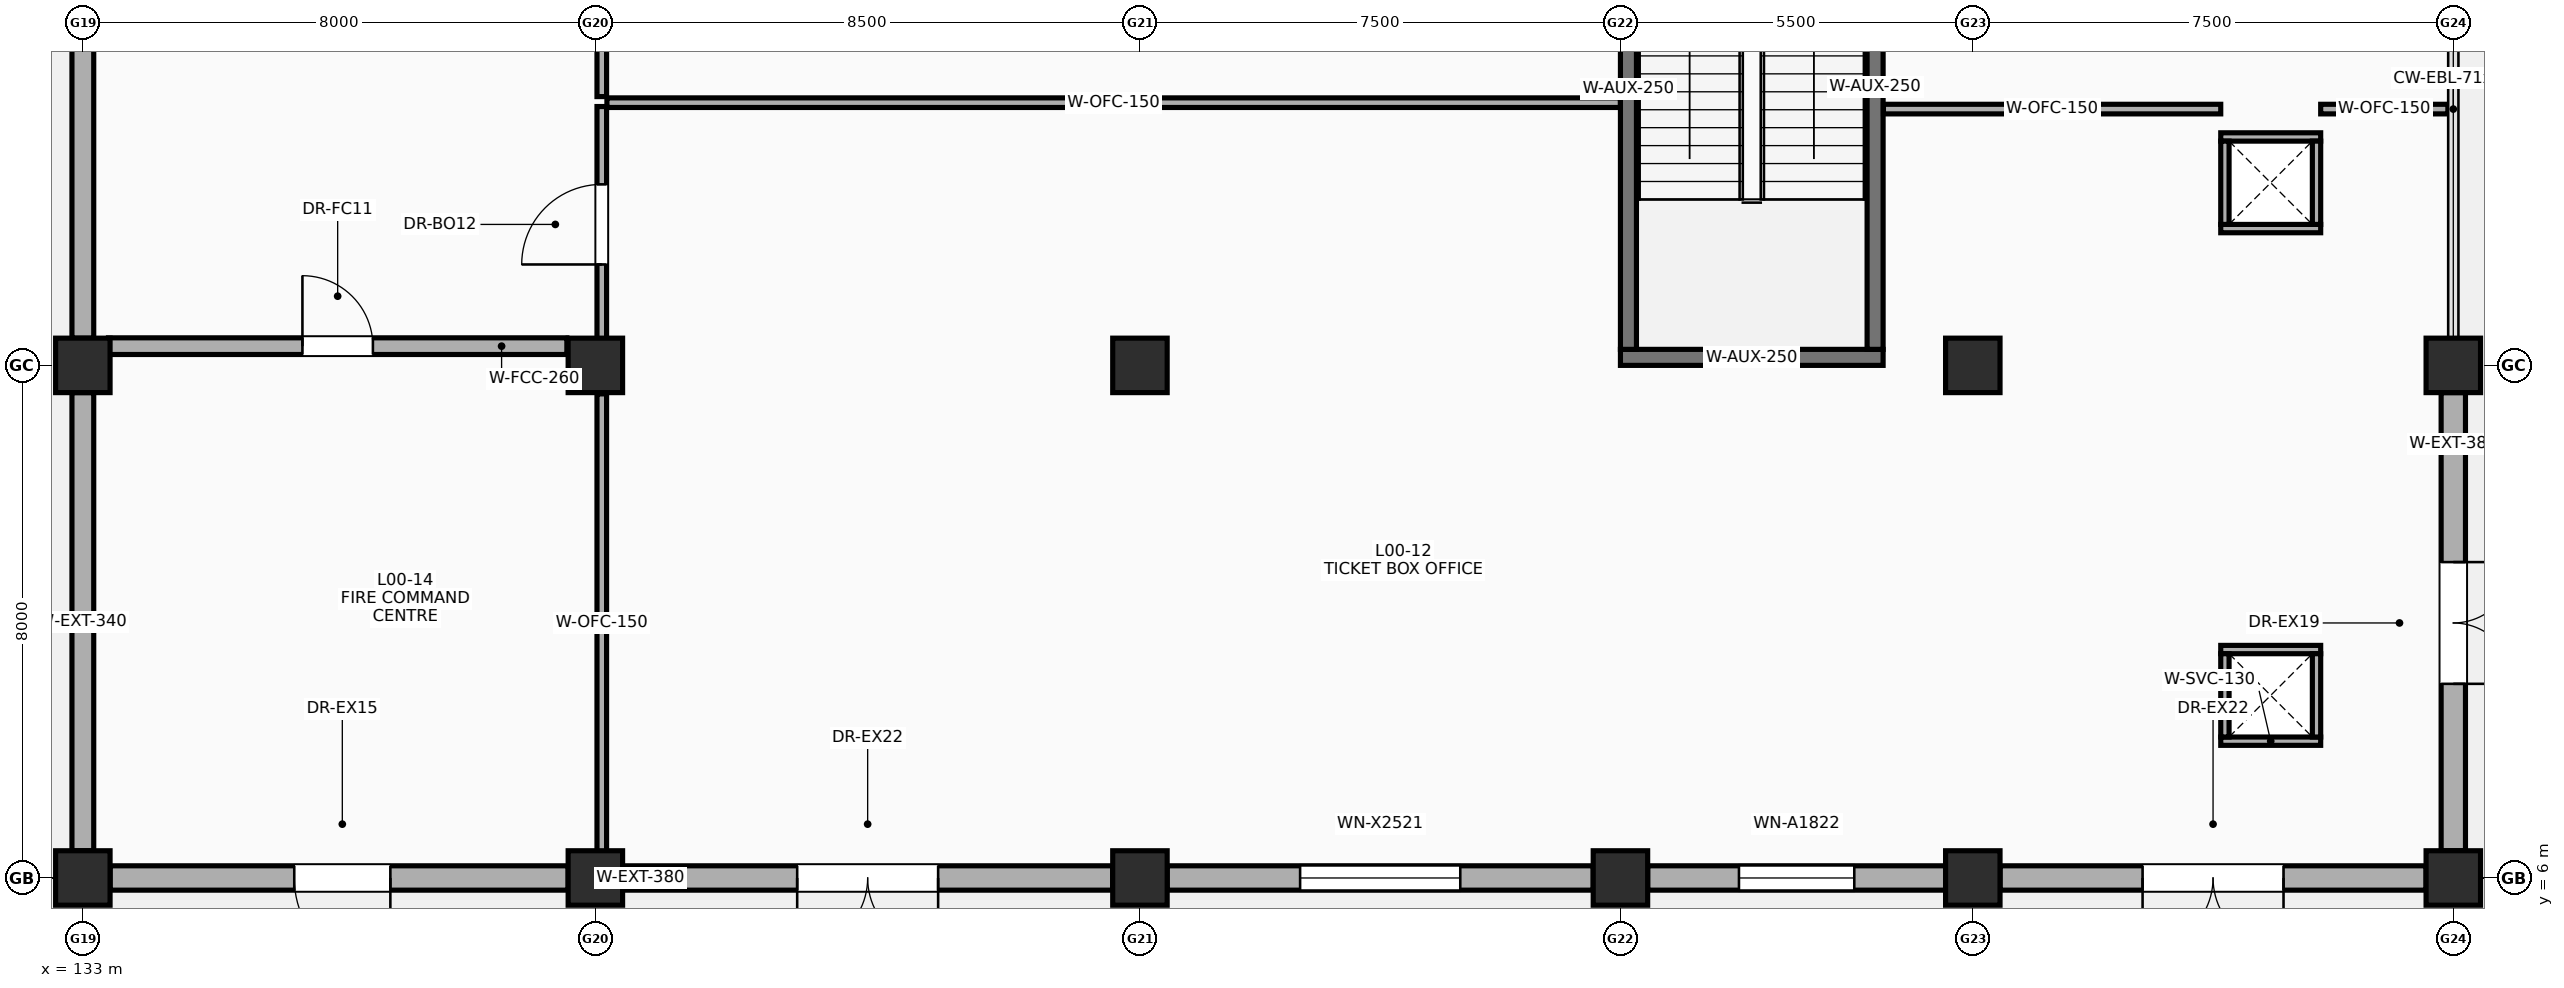
"""IFC4 building model, lengths in metres.
Left out: names, types, materials, properties, quantities, classifications, styles, units other than length and angle.
Written with IfcOpenShell. Run it as: python <this file> out.ifc"""

import sys

from ifc_helpers import new_model, si_unit, direction, frame, frame_2d, origin, origin_2d, place, context, subcontext, project, spatial, rectangle, extrude, element, fill, save


model = new_model("IFC4")
c1 = context("Model", 3, precision=1e-05, world=origin(), true_north=direction((0.0, 1.0)))
c2 = subcontext(c1, "Body", "Model", "MODEL_VIEW")
j1 = project(units=[si_unit("LENGTHUNIT", "METRE"), si_unit("PLANEANGLEUNIT", "RADIAN")], contexts=[c1])
p1 = place(None, origin())
s1 = spatial("IfcSite", under=j1, at=p1, CompositionType="ELEMENT")
p2 = place(p1, origin())
s2 = spatial("IfcBuilding", under=s1, at=p2, CompositionType="ELEMENT")
p3 = place(p2, origin())
s3 = spatial("IfcBuildingStorey", under=s2, at=p3, CompositionType="ELEMENT", Elevation=0.0)
for number, where, z_axis, x_axis in (
    (1, (133.0, 6.0, 0.0), (0.0, 0.0, 1.0), (1.0, 0.0, 0.0)),
    (2, (133.0, 14.0, 0.0), (0.0, 0.0, 1.0), (1.0, 0.0, 0.0)),
    (3, (141.0, 6.0, 0.0), (0.0, 0.0, 1.0), (1.0, 0.0, 0.0)),
    (4, (141.0, 14.0, 0.0), (0.0, 0.0, 1.0), (1.0, 0.0, 0.0)),
    (5, (149.5, 6.0, 0.0), (0.0, 0.0, 1.0), (1.0, 0.0, 0.0)),
    (6, (149.5, 14.0, 0.0), (0.0, 0.0, 1.0), (1.0, 0.0, 0.0)),
    (7, (157.0, 6.0, 0.0), (0.0, 0.0, 1.0), (1.0, 0.0, 0.0)),
    (8, (162.5, 6.0, 0.0), (0.0, 0.0, 1.0), (1.0, 0.0, 0.0)),
    (9, (162.5, 14.0, 0.0), (0.0, 0.0, 1.0), (1.0, 0.0, 0.0)),
    (10, (170.0, 6.0, 0.0), (0.0, 0.0, 1.0), (1.0, 0.0, 0.0)),
    (11, (170.0, 14.0, 0.0), (0.0, 0.0, 1.0), (1.0, 0.0, 0.0)),
):
    element("IfcColumn", number, at=place(p3, frame(where, z_axis=z_axis, x_axis=x_axis)), inside=s3, PredefinedType="COLUMN", context=c2, shape_type="SweptSolid", body=[
        extrude(rectangle(XDim=0.85, YDim=0.85, at=origin_2d()), origin(), (0.0, 0.0, 1.0), 5.4),
    ])
p4 = place(p3, frame((133.425, 6.0, 0.0), z_axis=(0.0, 0.0, 1.0), x_axis=(1.0, 0.0, 0.0)))
e12 = element("IfcWall", 12, at=p4, inside=s3, PredefinedType="SOLIDWALL", context=c2, shape_type="SweptSolid", body=[
    extrude(rectangle(XDim=7.15, YDim=0.38, at=frame_2d((3.575, 0.0))), origin(), (0.0, 0.0, 1.0), 4.15),
])
p5 = place(p4, frame((4.375, 0.0, 0.0), z_axis=(0.0, 0.0, 1.0), x_axis=(-1.0, 0.0, 0.0)))
e13 = element("IfcOpeningElement", 13, at=p5, cuts=e12, PredefinedType="OPENING", context=c2, shape_type="SweptSolid", body=[
    extrude(rectangle(XDim=1.5, YDim=2.25, at=frame_2d((0.75, 1.125))), frame((0.0, 0.2, 0.0), z_axis=(0.0, -1.0, 0.0), x_axis=(1.0, 0.0, 0.0)), (0.0, 0.0, 1.0), 0.4),
])
p6 = place(p3, frame((141.425, 6.0, 0.0), z_axis=(0.0, 0.0, 1.0), x_axis=(1.0, 0.0, 0.0)))
e14 = element("IfcWall", 14, at=p6, inside=s3, PredefinedType="SOLIDWALL", context=c2, shape_type="SweptSolid", body=[
    extrude(rectangle(XDim=7.65, YDim=0.38, at=frame_2d((3.825, 0.0))), origin(), (0.0, 0.0, 1.0), 4.15),
])
p7 = place(p6, frame((4.925, 0.0, 0.0), z_axis=(0.0, 0.0, 1.0), x_axis=(-1.0, 0.0, 0.0)))
e15 = element("IfcOpeningElement", 15, at=p7, cuts=e14, PredefinedType="OPENING", context=c2, shape_type="SweptSolid", body=[
    extrude(rectangle(XDim=2.2, YDim=2.6, at=frame_2d((1.1, 1.3))), frame((0.0, 0.2, 0.0), z_axis=(0.0, -1.0, 0.0), x_axis=(1.0, 0.0, 0.0)), (0.0, 0.0, 1.0), 0.4),
])
p8 = place(p3, frame((149.925, 6.0, 0.0), z_axis=(0.0, 0.0, 1.0), x_axis=(1.0, 0.0, 0.0)))
e16 = element("IfcWall", 16, at=p8, inside=s3, PredefinedType="SOLIDWALL", context=c2, shape_type="SweptSolid", body=[
    extrude(rectangle(XDim=6.65, YDim=0.38, at=frame_2d((3.325, 0.0))), origin(), (0.0, 0.0, 1.0), 3.9),
])
p9 = place(p8, frame((2.075, 0.0, 0.85)))
e17 = element("IfcOpeningElement", 17, at=p9, cuts=e16, PredefinedType="OPENING", context=c2, shape_type="SweptSolid", body=[
    extrude(rectangle(XDim=2.5, YDim=2.1, at=frame_2d((1.25, 1.05))), frame((0.0, 0.2, 0.0), z_axis=(0.0, -1.0, 0.0), x_axis=(1.0, 0.0, 0.0)), (0.0, 0.0, 1.0), 0.4),
])
p10 = place(p3, frame((157.425, 6.0, 0.0), z_axis=(0.0, 0.0, 1.0), x_axis=(1.0, 0.0, 0.0)))
e18 = element("IfcWall", 18, at=p10, inside=s3, PredefinedType="SOLIDWALL", context=c2, shape_type="SweptSolid", body=[
    extrude(rectangle(XDim=4.65, YDim=0.38, at=frame_2d((2.325, 0.0))), origin(), (0.0, 0.0, 1.0), 3.9),
])
p11 = place(p10, frame((1.425, 0.0, 0.85)))
e19 = element("IfcOpeningElement", 19, at=p11, cuts=e18, PredefinedType="OPENING", context=c2, shape_type="SweptSolid", body=[
    extrude(rectangle(XDim=1.8, YDim=2.2, at=frame_2d((0.9, 1.1))), frame((0.0, 0.2, 0.0), z_axis=(0.0, -1.0, 0.0), x_axis=(1.0, 0.0, 0.0)), (0.0, 0.0, 1.0), 0.4),
])
p12 = place(p3, frame((162.925, 6.0, 0.0), z_axis=(0.0, 0.0, 1.0), x_axis=(1.0, 0.0, 0.0)))
e20 = element("IfcWall", 20, at=p12, inside=s3, PredefinedType="SOLIDWALL", context=c2, shape_type="SweptSolid", body=[
    extrude(rectangle(XDim=6.65, YDim=0.38, at=frame_2d((3.325, 0.0))), origin(), (0.0, 0.0, 1.0), 4.15),
])
p13 = place(p12, frame((4.425, 0.0, 0.0), z_axis=(0.0, 0.0, 1.0), x_axis=(-1.0, 0.0, 0.0)))
e21 = element("IfcOpeningElement", 21, at=p13, cuts=e20, PredefinedType="OPENING", context=c2, shape_type="SweptSolid", body=[
    extrude(rectangle(XDim=2.2, YDim=2.6, at=frame_2d((1.1, 1.3))), frame((0.0, 0.2, 0.0), z_axis=(0.0, -1.0, 0.0), x_axis=(1.0, 0.0, 0.0)), (0.0, 0.0, 1.0), 0.4),
])
p14 = place(p3, frame((170.0, 6.425, 0.0), z_axis=(0.0, 0.0, 1.0), x_axis=(0.0, 1.0, 0.0)))
e22 = element("IfcWall", 22, at=p14, inside=s3, PredefinedType="SOLIDWALL", context=c2, shape_type="SweptSolid", body=[
    extrude(rectangle(XDim=7.15, YDim=0.38, at=frame_2d((3.575, 0.0))), origin(), (0.0, 0.0, 1.0), 4.15),
])
p15 = place(p14, frame((4.505, 0.0, 0.0), z_axis=(0.0, 0.0, 1.0), x_axis=(-1.0, 0.0, 0.0)))
e23 = element("IfcOpeningElement", 23, at=p15, cuts=e22, PredefinedType="OPENING", context=c2, shape_type="SweptSolid", body=[
    extrude(rectangle(XDim=1.9, YDim=2.35, at=frame_2d((0.95, 1.175))), frame((0.0, 0.2, 0.0), z_axis=(0.0, -1.0, 0.0), x_axis=(1.0, 0.0, 0.0)), (0.0, 0.0, 1.0), 0.4),
])
p16 = place(p3, frame((133.0, 6.425, 0.0), z_axis=(0.0, 0.0, 1.0), x_axis=(0.0, 1.0, 0.0)))
e24 = element("IfcWall", 24, at=p16, inside=s3, PredefinedType="SOLIDWALL", context=c2, shape_type="SweptSolid", body=[
    extrude(rectangle(XDim=7.15, YDim=0.34, at=frame_2d((3.575, 0.0))), origin(), (0.0, 0.0, 1.0), 4.15),
])
p17 = place(p3, frame((133.0, 14.425, 0.0), z_axis=(0.0, 0.0, 1.0), x_axis=(0.0, 1.0, 0.0)))
e25 = element("IfcWall", 25, at=p17, inside=s3, PredefinedType="SOLIDWALL", context=c2, shape_type="SweptSolid", body=[
    extrude(rectangle(XDim=7.125, YDim=0.34, at=frame_2d((3.562, 0.0))), origin(), (0.0, 0.0, 1.0), 4.15),
])
p18 = place(p3, frame((157.0, 14.125, 0.0), z_axis=(0.0, 0.0, 1.0), x_axis=(1.0, 0.0, 0.0)))
e26 = element("IfcWall", 26, at=p18, inside=s3, PredefinedType="SHEAR", context=c2, shape_type="SweptSolid", body=[
    extrude(rectangle(XDim=4.1, YDim=0.25, at=frame_2d((2.05, 0.0))), origin(), (0.0, 0.0, 1.0), 5.4),
])
p19 = place(p3, frame((160.975, 14.25, 0.0), z_axis=(0.0, 0.0, 1.0), x_axis=(0.0, 1.0, 0.0)))
e27 = element("IfcWall", 27, at=p19, inside=s3, PredefinedType="SHEAR", context=c2, shape_type="SweptSolid", body=[
    extrude(rectangle(XDim=8.2, YDim=0.25, at=frame_2d((4.1, 0.0))), origin(), (0.0, 0.0, 1.0), 5.4),
])
for number, where, z_axis, x_axis in (
    (28, (166.37, 8.135, 0.0), (0.0, 0.0, 1.0), (1.0, 0.0, 0.0)),
    (29, (166.37, 9.565, 0.0), (0.0, 0.0, 1.0), (1.0, 0.0, 0.0)),
):
    element("IfcWall", number, at=place(p3, frame(where, z_axis=z_axis, x_axis=x_axis)), inside=s3, PredefinedType="PARTITIONING", context=c2, shape_type="SweptSolid", body=[
        extrude(rectangle(XDim=1.56, YDim=0.13, at=frame_2d((0.78, 0.0))), origin(), (0.0, 0.0, 1.0), 5.1),
    ])
for number, where, z_axis, x_axis in (
    (30, (166.435, 8.2, 0.0), (0.0, 0.0, 1.0), (0.0, 1.0, 0.0)),
    (31, (167.865, 8.2, 0.0), (0.0, 0.0, 1.0), (0.0, 1.0, 0.0)),
):
    element("IfcWall", number, at=place(p3, frame(where, z_axis=z_axis, x_axis=x_axis)), inside=s3, PredefinedType="PARTITIONING", context=c2, shape_type="SweptSolid", body=[
        extrude(rectangle(XDim=1.3, YDim=0.13, at=frame_2d((0.65, 0.0))), origin(), (0.0, 0.0, 1.0), 5.1),
    ])
for number, where, z_axis, x_axis in (
    (32, (166.37, 16.135, 0.0), (0.0, 0.0, 1.0), (1.0, 0.0, 0.0)),
    (33, (166.37, 17.565, 0.0), (0.0, 0.0, 1.0), (1.0, 0.0, 0.0)),
):
    element("IfcWall", number, at=place(p3, frame(where, z_axis=z_axis, x_axis=x_axis)), inside=s3, PredefinedType="PARTITIONING", context=c2, shape_type="SweptSolid", body=[
        extrude(rectangle(XDim=1.56, YDim=0.13, at=frame_2d((0.78, 0.0))), origin(), (0.0, 0.0, 1.0), 5.1),
    ])
for number, where, z_axis, x_axis in (
    (34, (166.435, 16.2, 0.0), (0.0, 0.0, 1.0), (0.0, 1.0, 0.0)),
    (35, (167.865, 16.2, 0.0), (0.0, 0.0, 1.0), (0.0, 1.0, 0.0)),
):
    element("IfcWall", number, at=place(p3, frame(where, z_axis=z_axis, x_axis=x_axis)), inside=s3, PredefinedType="PARTITIONING", context=c2, shape_type="SweptSolid", body=[
        extrude(rectangle(XDim=1.3, YDim=0.13, at=frame_2d((0.65, 0.0))), origin(), (0.0, 0.0, 1.0), 5.1),
    ])
p20 = place(p3, frame((141.18, 18.1, 0.0), z_axis=(0.0, 0.0, 1.0), x_axis=(1.0, 0.0, 0.0)))
e36 = element("IfcWall", 36, at=p20, inside=s3, PredefinedType="PARTITIONING", context=c2, shape_type="SweptSolid", body=[
    extrude(rectangle(XDim=15.82, YDim=0.15, at=frame_2d((7.91, 0.0))), origin(), (0.0, 0.0, 1.0), 3.9),
])
p21 = place(p3, frame((141.1, 6.4, 0.0), z_axis=(0.0, 0.0, 1.0), x_axis=(0.0, 1.0, 0.0)))
e37 = element("IfcWall", 37, at=p21, inside=s3, PredefinedType="PARTITIONING", context=c2, shape_type="SweptSolid", body=[
    extrude(rectangle(XDim=7.155, YDim=0.15, at=frame_2d((3.578, 0.0))), origin(), (0.0, 0.0, 1.0), 4.2),
])
p22 = place(p3, frame((141.1, 14.4, 0.0), z_axis=(0.0, 0.0, 1.0), x_axis=(0.0, 1.0, 0.0)))
e38 = element("IfcWall", 38, at=p22, inside=s3, PredefinedType="PARTITIONING", context=c2, shape_type="SweptSolid", body=[
    extrude(rectangle(XDim=3.64, YDim=0.15, at=frame_2d((1.82, 0.0))), origin(), (0.0, 0.0, 1.0), 4.2),
])
p23 = place(p22, frame((1.175, 0.0, 0.0)))
e39 = element("IfcOpeningElement", 39, at=p23, cuts=e38, PredefinedType="OPENING", context=c2, shape_type="SweptSolid", body=[
    extrude(rectangle(XDim=1.25, YDim=2.15, at=frame_2d((0.625, 1.075))), frame((0.0, 0.085, 0.0), z_axis=(0.0, -1.0, 0.0), x_axis=(1.0, 0.0, 0.0)), (0.0, 0.0, 1.0), 0.17),
])
p24 = place(p3, frame((133.4, 14.3, 0.0), z_axis=(0.0, 0.0, 1.0), x_axis=(1.0, 0.0, 0.0)))
e40 = element("IfcWall", 40, at=p24, inside=s3, PredefinedType="SOLIDWALL", context=c2, shape_type="SweptSolid", body=[
    extrude(rectangle(XDim=7.155, YDim=0.26, at=frame_2d((3.578, 0.0))), origin(), (0.0, 0.0, 1.0), 4.2),
])
p25 = place(p24, frame((3.028, 0.0, 0.0)))
e41 = element("IfcOpeningElement", 41, at=p25, cuts=e40, PredefinedType="OPENING", context=c2, shape_type="SweptSolid", body=[
    extrude(rectangle(XDim=1.1, YDim=2.18, at=frame_2d((0.55, 1.09))), frame((0.0, 0.14, 0.0), z_axis=(0.0, -1.0, 0.0), x_axis=(1.0, 0.0, 0.0)), (0.0, 0.0, 1.0), 0.28),
])
p26 = place(p3, frame((161.105, 18.0, 0.0), z_axis=(0.0, 0.0, 1.0), x_axis=(1.0, 0.0, 0.0)))
e42 = element("IfcWall", 42, at=p26, inside=s3, PredefinedType="PARTITIONING", context=c2, shape_type="SweptSolid", body=[
    extrude(rectangle(XDim=5.265, YDim=0.15, at=frame_2d((2.633, 0.0))), origin(), (0.0, 0.0, 1.0), 4.2),
])
p27 = place(p3, frame((167.93, 18.0, 0.0), z_axis=(0.0, 0.0, 1.0), x_axis=(1.0, 0.0, 0.0)))
e43 = element("IfcWall", 43, at=p27, inside=s3, PredefinedType="PARTITIONING", context=c2, shape_type="SweptSolid", body=[
    extrude(rectangle(XDim=1.985, YDim=0.15, at=frame_2d((0.993, 0.0))), origin(), (0.0, 0.0, 1.0), 4.2),
])
p28 = place(p3, frame((157.125, 14.25, 0.0), z_axis=(0.0, 0.0, 1.0), x_axis=(0.0, 1.0, 0.0)))
e44 = element("IfcWall", 44, at=p28, inside=s3, PredefinedType="SHEAR", context=c2, shape_type="SweptSolid", body=[
    extrude(rectangle(XDim=8.13, YDim=0.25, at=frame_2d((4.065, 0.0))), origin(), (0.0, 0.0, 1.0), 5.4),
])
p29 = place(p3, frame((141.1, 18.195, 0.0), z_axis=(0.0, 0.0, 1.0), x_axis=(0.0, 1.0, 0.0)))
e45 = element("IfcWall", 45, at=p29, inside=s3, PredefinedType="PARTITIONING", context=c2, shape_type="SweptSolid", body=[
    extrude(rectangle(XDim=3.36, YDim=0.15, at=frame_2d((1.68, 0.0))), origin(), (0.0, 0.0, 1.0), 4.2),
])
p30 = place(p5, origin())
e46 = element("IfcDoor", 46, at=p30, inside=s3, OperationType="SINGLE_SWING_LEFT", PredefinedType="DOOR", context=c2, shape_type="SweptSolid", body=[
    extrude(rectangle(XDim=1.5, YDim=2.25, at=frame_2d((0.75, 1.125))), frame((0.0, 0.025, 0.0), z_axis=(0.0, -1.0, 0.0), x_axis=(1.0, 0.0, 0.0)), (0.0, 0.0, 1.0), 0.05),
])
fill(e13, e46)
p31 = place(p7, origin())
e47 = element("IfcDoor", 47, at=p31, inside=s3, OperationType="DOUBLE_DOOR_SINGLE_SWING", PredefinedType="DOOR", context=c2, shape_type="SweptSolid", body=[
    extrude(rectangle(XDim=2.2, YDim=2.6, at=frame_2d((1.1, 1.3))), frame((0.0, 0.025, 0.0), z_axis=(0.0, -1.0, 0.0), x_axis=(1.0, 0.0, 0.0)), (0.0, 0.0, 1.0), 0.05),
])
fill(e15, e47)
p32 = place(p9, origin())
e48 = element("IfcWindow", 48, at=p32, inside=s3, PartitioningType="SINGLE_PANEL", PredefinedType="WINDOW", context=c2, shape_type="SweptSolid", body=[
    extrude(rectangle(XDim=2.5, YDim=2.1, at=frame_2d((1.25, 1.05))), frame((0.0, 0.03, 0.0), z_axis=(0.0, -1.0, 0.0), x_axis=(1.0, 0.0, 0.0)), (0.0, 0.0, 1.0), 0.06),
])
fill(e17, e48)
p33 = place(p11, origin())
e49 = element("IfcWindow", 49, at=p33, inside=s3, PartitioningType="SINGLE_PANEL", PredefinedType="WINDOW", context=c2, shape_type="SweptSolid", body=[
    extrude(rectangle(XDim=1.8, YDim=2.2, at=frame_2d((0.9, 1.1))), frame((0.0, 0.03, 0.0), z_axis=(0.0, -1.0, 0.0), x_axis=(1.0, 0.0, 0.0)), (0.0, 0.0, 1.0), 0.06),
])
fill(e19, e49)
p34 = place(p13, origin())
e50 = element("IfcDoor", 50, at=p34, inside=s3, OperationType="DOUBLE_DOOR_SINGLE_SWING", PredefinedType="DOOR", context=c2, shape_type="SweptSolid", body=[
    extrude(rectangle(XDim=2.2, YDim=2.6, at=frame_2d((1.1, 1.3))), frame((0.0, 0.025, 0.0), z_axis=(0.0, -1.0, 0.0), x_axis=(1.0, 0.0, 0.0)), (0.0, 0.0, 1.0), 0.05),
])
fill(e21, e50)
p35 = place(p15, origin())
e51 = element("IfcDoor", 51, at=p35, inside=s3, OperationType="DOUBLE_DOOR_SINGLE_SWING", PredefinedType="DOOR", context=c2, shape_type="SweptSolid", body=[
    extrude(rectangle(XDim=1.9, YDim=2.35, at=frame_2d((0.95, 1.175))), frame((0.0, 0.025, 0.0), z_axis=(0.0, -1.0, 0.0), x_axis=(1.0, 0.0, 0.0)), (0.0, 0.0, 1.0), 0.05),
])
fill(e23, e51)
p36 = place(p23, origin())
e52 = element("IfcDoor", 52, at=p36, inside=s3, OperationType="SINGLE_SWING_LEFT", PredefinedType="DOOR", context=c2, shape_type="SweptSolid", body=[
    extrude(rectangle(XDim=1.25, YDim=2.15, at=frame_2d((0.625, 1.075))), frame((0.0, 0.025, 0.0), z_axis=(0.0, -1.0, 0.0), x_axis=(1.0, 0.0, 0.0)), (0.0, 0.0, 1.0), 0.05),
])
fill(e39, e52)
p37 = place(p25, origin())
e53 = element("IfcDoor", 53, at=p37, inside=s3, OperationType="SINGLE_SWING_LEFT", PredefinedType="DOOR", context=c2, shape_type="SweptSolid", body=[
    extrude(rectangle(XDim=1.1, YDim=2.18, at=frame_2d((0.55, 1.09))), frame((0.0, 0.025, 0.0), z_axis=(0.0, -1.0, 0.0), x_axis=(1.0, 0.0, 0.0)), (0.0, 0.0, 1.0), 0.05),
])
fill(e41, e53)
save(model, sys.argv[1])
